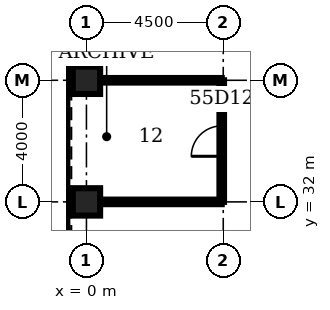
"""IFC4 building model, lengths in metres.
Left out: names, types, materials, properties, quantities, classifications, styles, units other than length and angle.
Written with IfcOpenShell. Run it as: python <this file> out.ifc"""

import sys

from ifc_helpers import new_model, si_unit, direction, frame, frame_2d, origin, origin_2d, place, context, subcontext, project, spatial, rectangle, hollow_rectangle, extrude, element, fill, save


model = new_model("IFC4")
c1 = context("Model", 3, precision=1e-05, world=origin(), true_north=direction((0.0, 1.0)))
c2 = subcontext(c1, "Body", "Model", "MODEL_VIEW")
j1 = project(units=[si_unit("LENGTHUNIT", "METRE"), si_unit("PLANEANGLEUNIT", "RADIAN")], contexts=[c1])
p1 = place(None, origin())
s1 = spatial("IfcSite", under=j1, at=p1, CompositionType="ELEMENT")
p2 = place(p1, origin())
s2 = spatial("IfcBuilding", under=s1, at=p2, CompositionType="ELEMENT")
p3 = place(p2, frame((0.0, 0.0, 244.6)))
s3 = spatial("IfcBuildingStorey", under=s2, at=p3, CompositionType="ELEMENT", Elevation=244.6)
for number, where, z_axis, x_axis in (
    (1, (0.0, 36.0, 0.0), (0.0, 0.0, 1.0), (1.0, 0.0, 0.0)),
    (2, (0.0, 32.0, 0.0), (0.0, 0.0, 1.0), (1.0, 0.0, 0.0)),
):
    element("IfcColumn", number, at=place(p3, frame(where, z_axis=z_axis, x_axis=x_axis)), inside=s3, PredefinedType="COLUMN", context=c2, shape_type="SweptSolid", body=[
        extrude(hollow_rectangle(XDim=0.9, YDim=0.9, WallThickness=0.08, at=origin_2d()), origin(), (0.0, 0.0, 1.0), 4.2),
    ])
for number, where, z_axis, x_axis in (
    (3, (0.45, 32.0, 0.0), (0.0, 0.0, 1.0), (1.0, 0.0, 0.0)),
    (4, (0.45, 36.0, 0.0), (0.0, 0.0, 1.0), (1.0, 0.0, 0.0)),
):
    element("IfcWall", number, at=place(p3, frame(where, z_axis=z_axis, x_axis=x_axis)), inside=s3, PredefinedType="PARTITIONING", context=c2, shape_type="SweptSolid", body=[
        extrude(rectangle(XDim=4.0, YDim=0.15, at=frame_2d((2.0, 0.0))), origin(), (0.0, 0.0, 1.0), 3.0),
    ])
p4 = place(p3, frame((4.45, 32.0, 0.0), z_axis=(0.0, 0.0, 1.0), x_axis=(0.0, 1.0, 0.0)))
e5 = element("IfcWall", 5, at=p4, inside=s3, PredefinedType="PARTITIONING", context=c2, shape_type="SweptSolid", body=[
    extrude(rectangle(XDim=4.0, YDim=0.15, at=frame_2d((2.0, 0.0))), origin(), (0.0, 0.0, 1.0), 3.0),
])
p5 = place(p4, frame((1.5, 0.0, 0.0)))
e6 = element("IfcOpeningElement", 6, at=p5, cuts=e5, PredefinedType="OPENING", context=c2, shape_type="SweptSolid", body=[
    extrude(rectangle(XDim=1.0, YDim=2.1, at=frame_2d((0.5, 1.05))), frame((0.0, 0.085, 0.0), z_axis=(0.0, -1.0, 0.0), x_axis=(1.0, 0.0, 0.0)), (0.0, 0.0, 1.0), 0.17),
])
p6 = place(p5, origin())
e7 = element("IfcDoor", 7, at=p6, inside=s3, OperationType="SINGLE_SWING_LEFT", PredefinedType="DOOR", context=c2, shape_type="SweptSolid", body=[
    extrude(rectangle(XDim=1.0, YDim=2.1, at=frame_2d((0.5, 1.05))), frame((0.0, 0.025, 0.0), z_axis=(0.0, -1.0, 0.0), x_axis=(1.0, 0.0, 0.0)), (0.0, 0.0, 1.0), 0.05),
])
fill(e6, e7)
save(model, sys.argv[1])
